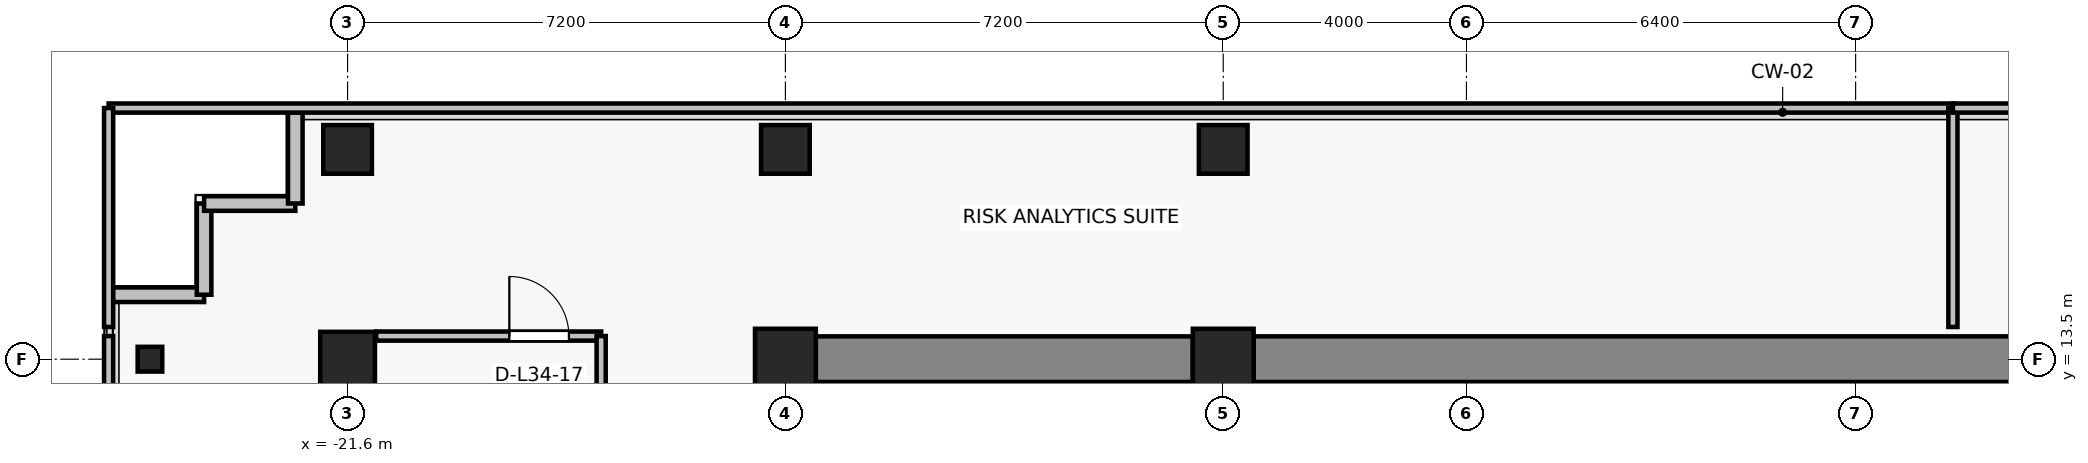
"""IFC4 building model, lengths in metres.
Left out: names, types, materials, properties, quantities, classifications, styles, units other than length and angle.
Written with IfcOpenShell. Run it as: python <this file> out.ifc"""

import sys

from ifc_helpers import new_model, si_unit, direction, frame, frame_2d, origin, origin_2d, place, context, subcontext, project, spatial, rectangle, i_section, extrude, source, transform, mapped, element, fill, save


model = new_model("IFC4")
c1 = context("Model", 3, precision=1e-05, world=origin(), true_north=direction((0.0, 1.0)))
c2 = subcontext(c1, "Body", "Model", "MODEL_VIEW")
j1 = project(units=[si_unit("LENGTHUNIT", "METRE"), si_unit("PLANEANGLEUNIT", "RADIAN")], contexts=[c1])
p1 = place(None, origin())
s1 = spatial("IfcSite", under=j1, at=p1, CompositionType="ELEMENT")
p2 = place(p1, origin())
s2 = spatial("IfcBuilding", under=s1, at=p2, CompositionType="ELEMENT")
p3 = place(p2, frame((0.0, 0.0, 123.1)))
s3 = spatial("IfcBuildingStorey", under=s2, at=p3, CompositionType="ELEMENT", Elevation=123.1)
for number, where, z_axis, x_axis in (
    (1, (-14.4, 13.5, 0.0), (0.0, 0.0, 1.0), (1.0, 0.0, 0.0)),
    (2, (-7.2, 13.5, 0.0), (0.0, 0.0, 1.0), (1.0, 0.0, 0.0)),
):
    element("IfcColumn", number, at=place(p3, frame(where, z_axis=z_axis, x_axis=x_axis)), inside=s3, PredefinedType="COLUMN", context=c2, shape_type="SweptSolid", body=[
        extrude(rectangle(XDim=1.0, YDim=1.0, at=origin_2d()), origin(), (0.0, 0.0, 1.0), 3.3),
    ])
p4 = place(p3, frame((-21.6, 13.5, 0.0), z_axis=(0.0, 0.0, 1.0), x_axis=(1.0, 0.0, 0.0)))
e3 = element("IfcColumn", 3, at=p4, inside=s3, PredefinedType="COLUMN", context=c2, shape_type="SweptSolid", body=[
    extrude(rectangle(XDim=0.9, YDim=0.9, at=origin_2d()), origin(), (0.0, 0.0, 1.0), 3.3),
])
for number, where, z_axis, x_axis in (
    (4, (-14.4, 16.95, 0.0), (0.0, 0.0, 1.0), (1.0, 0.0, 0.0)),
    (5, (-7.2, 16.95, 0.0), (0.0, 0.0, 1.0), (1.0, 0.0, 0.0)),
    (6, (-21.6, 16.95, 0.0), (0.0, 0.0, 1.0), (1.0, 0.0, 0.0)),
):
    element("IfcColumn", number, at=place(p3, frame(where, z_axis=z_axis, x_axis=x_axis)), inside=s3, PredefinedType="COLUMN", context=c2, shape_type="SweptSolid", body=[
        extrude(rectangle(XDim=0.8, YDim=0.8, at=origin_2d()), origin(), (0.0, 0.0, 1.0), 3.3),
    ])
p5 = place(p3, frame((-24.85, 13.5, 0.0), z_axis=(0.0, 0.0, 1.0), x_axis=(1.0, 0.0, 0.0)))
e7 = element("IfcColumn", 7, at=p5, inside=s3, PredefinedType="COLUMN", context=c2, shape_type="SweptSolid", body=[
    extrude(i_section(OverallWidth=0.404, OverallDepth=0.407, WebThickness=0.022, FlangeThickness=0.032, FilletRadius=0.015, at=origin_2d()), origin(), (0.0, 0.0, 1.0), 3.3),
])
p6 = place(p3, frame((-13.9, 13.5, 0.0), z_axis=(0.0, 0.0, 1.0), x_axis=(1.0, 0.0, 0.0)))
e8 = element("IfcWall", 8, at=p6, inside=s3, PredefinedType="SHEAR", context=c2, shape_type="SweptSolid", body=[
    extrude(rectangle(XDim=6.2, YDim=0.75, at=frame_2d((3.1, 0.0))), origin(), (0.0, 0.0, 1.0), 3.075),
])
p7 = place(p3, frame((-6.7, 13.5, 0.0), z_axis=(0.0, 0.0, 1.0), x_axis=(1.0, 0.0, 0.0)))
e9 = element("IfcWall", 9, at=p7, inside=s3, PredefinedType="SHEAR", context=c2, shape_type="SweptSolid", body=[
    extrude(rectangle(XDim=13.4, YDim=0.75, at=frame_2d((6.7, 0.0))), origin(), (0.0, 0.0, 1.0), 3.075),
])
for number, where, z_axis, x_axis in (
    (10, (-23.96, 14.56, 0.0), (0.0, 0.0, 1.0), (-1.0, 0.0, 0.0)),
    (11, (-23.96, 16.06, 0.0), (0.0, 0.0, 1.0), (0.0, -1.0, 0.0)),
    (12, (-22.46, 16.06, 0.0), (0.0, 0.0, 1.0), (-1.0, 0.0, 0.0)),
):
    element("IfcWall", number, at=place(p3, frame(where, z_axis=z_axis, x_axis=x_axis)), inside=s3, PredefinedType="SOLIDWALL", context=c2, shape_type="SweptSolid", body=[
        extrude(rectangle(XDim=1.5, YDim=0.24, at=frame_2d((0.75, 0.0))), origin(), (0.0, 0.0, 1.0), 3.075),
    ])
p8 = place(p3, frame((-22.46, 17.56, 0.0), z_axis=(0.0, 0.0, 1.0), x_axis=(0.0, -1.0, 0.0)))
e13 = element("IfcWall", 13, at=p8, inside=s3, PredefinedType="SOLIDWALL", context=c2, shape_type="SweptSolid", body=[
    extrude(rectangle(XDim=1.5, YDim=0.24, at=frame_2d((0.75, 0.0))), origin(), (0.0, 0.0, 1.0), 2.565),
])
p9 = place(p3, frame((-21.13, 13.88, 0.0), z_axis=(0.0, 0.0, 1.0), x_axis=(1.0, 0.0, 0.0)))
e14 = element("IfcWall", 14, at=p9, inside=s3, PredefinedType="PARTITIONING", context=c2, shape_type="SweptSolid", body=[
    extrude(rectangle(XDim=3.7, YDim=0.15, at=frame_2d((1.85, 0.0))), origin(), (0.0, 0.0, 1.0), 3.075),
])
p10 = place(p9, frame((2.19, 0.0, 0.0)))
e15 = element("IfcOpeningElement", 15, at=p10, cuts=e14, PredefinedType="OPENING", context=c2, shape_type="SweptSolid", body=[
    extrude(rectangle(XDim=0.98, YDim=2.15, at=frame_2d((0.49, 1.075))), frame((0.0, 0.085, 0.0), z_axis=(0.0, -1.0, 0.0), x_axis=(1.0, 0.0, 0.0)), (0.0, 0.0, 1.0), 0.17),
])
p11 = place(p3, frame((-25.53, -1.77, 0.0), z_axis=(0.0, 0.0, 1.0), x_axis=(0.0, 1.0, 0.0)))
e16 = element("IfcWall", 16, at=p11, inside=s3, PredefinedType="PARTITIONING", context=c2, shape_type="SweptSolid", body=[
    extrude(rectangle(XDim=15.65, YDim=0.15, at=frame_2d((7.825, 0.0))), origin(), (0.0, 0.0, 1.0), 3.075),
])
p12 = place(p3, frame((-17.43, 13.88, 0.0), z_axis=(0.0, 0.0, 1.0), x_axis=(0.0, -1.0, 0.0)))
e17 = element("IfcWall", 17, at=p12, inside=s3, PredefinedType="PARTITIONING", context=c2, shape_type="SweptSolid", body=[
    extrude(rectangle(XDim=15.65, YDim=0.15, at=frame_2d((7.825, 0.0))), origin(), (0.0, 0.0, 1.0), 2.515),
])
p13 = place(p12, frame((7.335, 0.0, 0.0)))
e18 = element("IfcOpeningElement", 18, at=p13, cuts=e17, PredefinedType="OPENING", context=c2, shape_type="SweptSolid", body=[
    extrude(rectangle(XDim=0.98, YDim=2.15, at=frame_2d((0.49, 1.075))), frame((0.0, 0.085, 0.0), z_axis=(0.0, -1.0, 0.0), x_axis=(1.0, 0.0, 0.0)), (0.0, 0.0, 1.0), 0.17),
])
p14 = place(p3, frame((-25.53, 17.63, 0.0), z_axis=(0.0, 0.0, 1.0), x_axis=(1.0, 0.0, 0.0)))
e19 = element("IfcWall", 19, at=p14, inside=s3, PredefinedType="PARTITIONING", context=c2, shape_type="SweptSolid", body=[
    extrude(rectangle(XDim=30.33, YDim=0.15, at=frame_2d((15.165, 0.0))), origin(), (0.0, 0.0, 1.0), 3.075),
])
p15 = place(p3, frame((-25.53, 14.03, 0.0), z_axis=(0.0, 0.0, 1.0), x_axis=(0.0, 1.0, 0.0)))
e20 = element("IfcWall", 20, at=p15, inside=s3, PredefinedType="PARTITIONING", context=c2, shape_type="SweptSolid", body=[
    extrude(rectangle(XDim=3.6, YDim=0.15, at=frame_2d((1.8, 0.0))), origin(), (0.0, 0.0, 1.0), 3.075),
])
p16 = place(p3, frame((4.8, 17.63, 0.0), z_axis=(0.0, 0.0, 1.0), x_axis=(0.0, -1.0, 0.0)))
e21 = element("IfcWall", 21, at=p16, inside=s3, PredefinedType="PARTITIONING", context=c2, shape_type="SweptSolid", body=[
    extrude(rectangle(XDim=3.6, YDim=0.15, at=frame_2d((1.8, 0.0))), origin(), (0.0, 0.0, 1.0), 2.565),
])
p17 = place(p3, frame((4.8, 17.63, 0.0), z_axis=(0.0, 0.0, 1.0), x_axis=(1.0, 0.0, 0.0)))
e22 = element("IfcWall", 22, at=p17, inside=s3, PredefinedType="PARTITIONING", context=c2, shape_type="SweptSolid", body=[
    extrude(rectangle(XDim=24.73, YDim=0.15, at=frame_2d((12.365, 0.0))), origin(), (0.0, 0.0, 1.0), 3.075),
])
m1 = source(origin(), c2, "Body", "SweptSolid", [
    extrude(rectangle(XDim=0.98, YDim=2.15, at=frame_2d((0.49, 1.075))), frame((0.0, 0.025, 0.0), z_axis=(0.0, -1.0, 0.0), x_axis=(1.0, 0.0, 0.0)), (0.0, 0.0, 1.0), 0.05),
])
p18 = place(p10, origin())
e23 = element("IfcDoor", 23, at=p18, inside=s3, OperationType="SINGLE_SWING_LEFT", PredefinedType="DOOR", context=c2, shape_type="MappedRepresentation", body=[
    mapped(m1, transform((0.0, 0.0, 0.0), x_axis=(1.0, 0.0, 0.0), y_axis=(0.0, 1.0, 0.0), z_axis=(0.0, 0.0, 1.0), scale=1.0)),
])
fill(e15, e23)
save(model, sys.argv[1])
